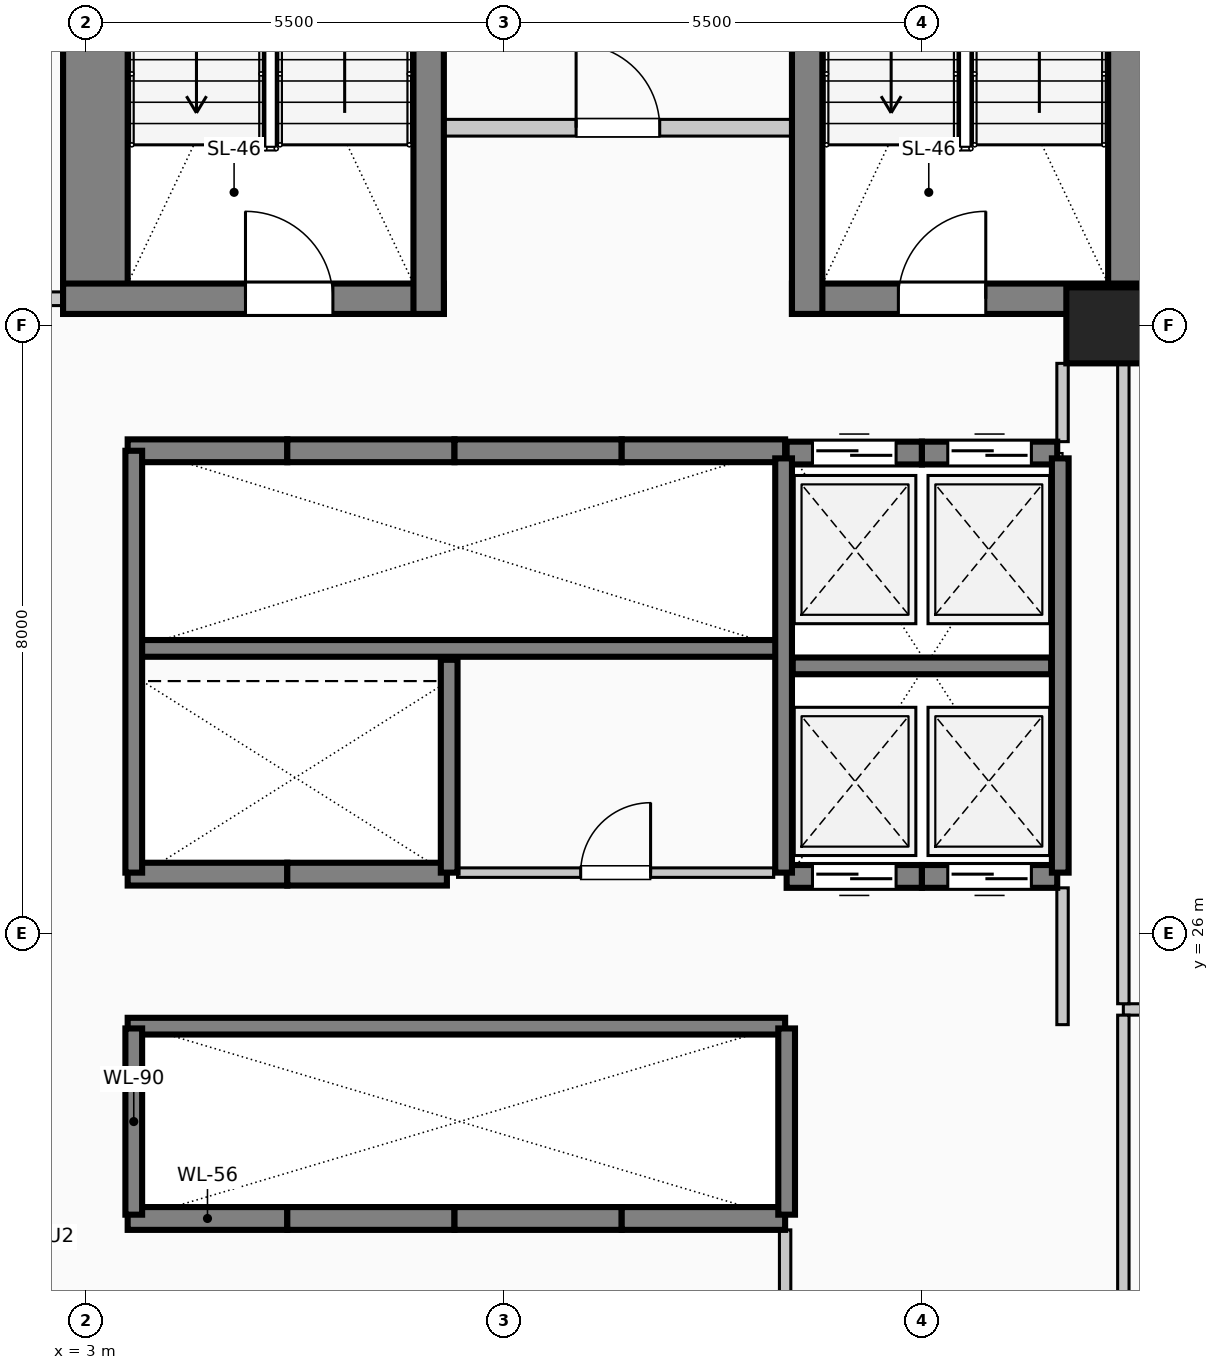
"""IFC4 building model, lengths in metres.
Left out: names, types, materials, properties, quantities, classifications, styles, units other than length and angle.
Written with IfcOpenShell. Run it as: python <this file> out.ifc"""

import sys

from ifc_helpers import new_model, si_unit, direction, frame, frame_2d, origin, origin_2d, place, context, subcontext, project, spatial, rectangle, circle, extrude, element, fill, save


model = new_model("IFC4")
c1 = context("Model", 3, precision=1e-05, world=origin(), true_north=direction((0.0, 1.0)))
c2 = subcontext(c1, "Body", "Model", "MODEL_VIEW")
j1 = project(units=[si_unit("LENGTHUNIT", "METRE"), si_unit("PLANEANGLEUNIT", "RADIAN")], contexts=[c1])
p1 = place(None, origin())
s1 = spatial("IfcSite", under=j1, at=p1, CompositionType="ELEMENT")
p2 = place(p1, origin())
s2 = spatial("IfcBuilding", under=s1, at=p2, CompositionType="ELEMENT")
p3 = place(p2, frame((0.0, 0.0, 92.6)))
s3 = spatial("IfcBuildingStorey", under=s2, at=p3, CompositionType="ELEMENT", Elevation=92.6)
for number, where, z_axis, x_axis in (
    (1, (3.125, 34.15, 0.0), (0.0, 0.0, 1.0), (0.0, 1.0, 0.0)),
    (2, (16.875, 34.15, 0.0), (0.0, 0.0, 1.0), (0.0, 1.0, 0.0)),
):
    element("IfcWall", number, at=place(p3, frame(where, z_axis=z_axis, x_axis=x_axis)), inside=s3, PredefinedType="SHEAR", context=c2, shape_type="SweptSolid", body=[
        extrude(rectangle(XDim=9.13, YDim=0.85, at=frame_2d((4.565, 0.0))), origin(), (0.0, 0.0, 1.0), 4.0),
    ])
p4 = place(p3, frame((2.7, 34.35, 0.0), z_axis=(0.0, 0.0, 1.0), x_axis=(1.0, 0.0, 0.0)))
e3 = element("IfcWall", 3, at=p4, inside=s3, PredefinedType="SHEAR", context=c2, shape_type="SweptSolid", body=[
    extrude(rectangle(XDim=5.01, YDim=0.4, at=frame_2d((2.505, 0.0))), origin(), (0.0, 0.0, 1.0), 4.0),
])
p5 = place(p4, frame((2.4, 0.0, 0.0)))
e4 = element("IfcOpeningElement", 4, at=p5, cuts=e3, PredefinedType="OPENING", context=c2, shape_type="SweptSolid", body=[
    extrude(rectangle(XDim=1.15, YDim=2.2, at=frame_2d((0.575, 1.1))), frame((0.0, 0.21, 0.0), z_axis=(0.0, -1.0, 0.0), x_axis=(1.0, 0.0, 0.0)), (0.0, 0.0, 1.0), 0.42),
])
p6 = place(p3, frame((12.29, 34.35, 0.0), z_axis=(0.0, 0.0, 1.0), x_axis=(1.0, 0.0, 0.0)))
e5 = element("IfcWall", 5, at=p6, inside=s3, PredefinedType="SHEAR", context=c2, shape_type="SweptSolid", body=[
    extrude(rectangle(XDim=5.01, YDim=0.4, at=frame_2d((2.505, 0.0))), origin(), (0.0, 0.0, 1.0), 4.0),
])
p7 = place(p6, frame((1.4, 0.0, 0.0)))
e6 = element("IfcOpeningElement", 6, at=p7, cuts=e5, PredefinedType="OPENING", context=c2, shape_type="SweptSolid", body=[
    extrude(rectangle(XDim=1.15, YDim=2.2, at=frame_2d((0.575, 1.1))), frame((0.0, 0.21, 0.0), z_axis=(0.0, -1.0, 0.0), x_axis=(1.0, 0.0, 0.0)), (0.0, 0.0, 1.0), 0.42),
])
for number, where, z_axis, x_axis in (
    (7, (7.51, 34.15, 0.0), (0.0, 0.0, 1.0), (0.0, 1.0, 0.0)),
    (8, (12.49, 34.15, 0.0), (0.0, 0.0, 1.0), (0.0, 1.0, 0.0)),
):
    element("IfcWall", number, at=place(p3, frame(where, z_axis=z_axis, x_axis=x_axis)), inside=s3, PredefinedType="SHEAR", context=c2, shape_type="SweptSolid", body=[
        extrude(rectangle(XDim=9.13, YDim=0.4, at=frame_2d((4.565, 0.0))), origin(), (0.0, 0.0, 1.0), 4.0),
    ])
p8 = place(p3, frame((16.4, 34.0, 0.0), z_axis=(0.0, 0.0, 1.0), x_axis=(1.0, 0.0, 0.0)))
e9 = element("IfcColumn", 9, at=p8, inside=s3, PredefinedType="COLUMN", context=c2, shape_type="SweptSolid", body=[
    extrude(circle(Radius=0.5, at=origin_2d()), origin(), (0.0, 0.0, 1.0), 4.0),
])
p9 = place(p3, frame((5.65, 22.25, 0.0), z_axis=(0.0, 0.0, 1.0), x_axis=(-1.0, 0.0, 0.0)))
e10 = element("IfcWall", 10, at=p9, inside=s3, PredefinedType="SOLIDWALL", context=c2, shape_type="SweptSolid", body=[
    extrude(rectangle(XDim=2.1, YDim=0.3, at=frame_2d((1.05, 0.0))), origin(), (0.0, 0.0, 1.0), 4.0),
])
p10 = place(p3, frame((7.85, 22.25, 0.0), z_axis=(0.0, 0.0, 1.0), x_axis=(-1.0, 0.0, 0.0)))
e11 = element("IfcWall", 11, at=p10, inside=s3, PredefinedType="SOLIDWALL", context=c2, shape_type="SweptSolid", body=[
    extrude(rectangle(XDim=2.2, YDim=0.3, at=frame_2d((1.1, 0.0))), origin(), (0.0, 0.0, 1.0), 4.0),
])
p11 = place(p3, frame((10.05, 22.25, 0.0), z_axis=(0.0, 0.0, 1.0), x_axis=(-1.0, 0.0, 0.0)))
e12 = element("IfcWall", 12, at=p11, inside=s3, PredefinedType="SOLIDWALL", context=c2, shape_type="SweptSolid", body=[
    extrude(rectangle(XDim=2.2, YDim=0.3, at=frame_2d((1.1, 0.0))), origin(), (0.0, 0.0, 1.0), 4.0),
])
p12 = place(p3, frame((12.2, 22.25, 0.0), z_axis=(0.0, 0.0, 1.0), x_axis=(-1.0, 0.0, 0.0)))
e13 = element("IfcWall", 13, at=p12, inside=s3, PredefinedType="SOLIDWALL", context=c2, shape_type="SweptSolid", body=[
    extrude(rectangle(XDim=2.15, YDim=0.3, at=frame_2d((1.075, 0.0))), origin(), (0.0, 0.0, 1.0), 4.0),
])
p13 = place(p3, frame((14.0, 26.75, 0.0), z_axis=(0.0, 0.0, 1.0), x_axis=(-1.0, 0.0, 0.0)))
e14 = element("IfcWall", 14, at=p13, inside=s3, PredefinedType="SOLIDWALL", context=c2, shape_type="SweptSolid", body=[
    extrude(rectangle(XDim=1.78, YDim=0.3, at=frame_2d((0.89, 0.0))), origin(), (0.0, 0.0, 1.0), 4.0),
])
p14 = place(p13, frame((0.34, 0.0, 0.0)))
e15 = element("IfcOpeningElement", 15, at=p14, cuts=e14, PredefinedType="OPENING", context=c2, shape_type="SweptSolid", body=[
    extrude(rectangle(XDim=1.1, YDim=2.2, at=frame_2d((0.55, 1.1))), frame((0.0, 0.16, 0.0), z_axis=(0.0, -1.0, 0.0), x_axis=(1.0, 0.0, 0.0)), (0.0, 0.0, 1.0), 0.32),
])
p15 = place(p3, frame((15.78, 26.75, 0.0), z_axis=(0.0, 0.0, 1.0), x_axis=(-1.0, 0.0, 0.0)))
e16 = element("IfcWall", 16, at=p15, inside=s3, PredefinedType="SOLIDWALL", context=c2, shape_type="SweptSolid", body=[
    extrude(rectangle(XDim=1.78, YDim=0.3, at=frame_2d((0.89, 0.0))), origin(), (0.0, 0.0, 1.0), 4.0),
])
p16 = place(p15, frame((0.34, 0.0, 0.0)))
e17 = element("IfcOpeningElement", 17, at=p16, cuts=e16, PredefinedType="OPENING", context=c2, shape_type="SweptSolid", body=[
    extrude(rectangle(XDim=1.1, YDim=2.2, at=frame_2d((0.55, 1.1))), frame((0.0, 0.16, 0.0), z_axis=(0.0, -1.0, 0.0), x_axis=(1.0, 0.0, 0.0)), (0.0, 0.0, 1.0), 0.32),
])
p17 = place(p3, frame((12.22, 32.32, 0.0), z_axis=(0.0, 0.0, 1.0), x_axis=(1.0, 0.0, 0.0)))
e18 = element("IfcWall", 18, at=p17, inside=s3, PredefinedType="SOLIDWALL", context=c2, shape_type="SweptSolid", body=[
    extrude(rectangle(XDim=1.78, YDim=0.3, at=frame_2d((0.89, 0.0))), origin(), (0.0, 0.0, 1.0), 4.0),
])
p18 = place(p17, frame((0.34, 0.0, 0.0)))
e19 = element("IfcOpeningElement", 19, at=p18, cuts=e18, PredefinedType="OPENING", context=c2, shape_type="SweptSolid", body=[
    extrude(rectangle(XDim=1.1, YDim=2.2, at=frame_2d((0.55, 1.1))), frame((0.0, 0.16, 0.0), z_axis=(0.0, -1.0, 0.0), x_axis=(1.0, 0.0, 0.0)), (0.0, 0.0, 1.0), 0.32),
])
p19 = place(p3, frame((14.0, 32.32, 0.0), z_axis=(0.0, 0.0, 1.0), x_axis=(1.0, 0.0, 0.0)))
e20 = element("IfcWall", 20, at=p19, inside=s3, PredefinedType="SOLIDWALL", context=c2, shape_type="SweptSolid", body=[
    extrude(rectangle(XDim=1.78, YDim=0.3, at=frame_2d((0.89, 0.0))), origin(), (0.0, 0.0, 1.0), 4.0),
])
p20 = place(p19, frame((0.34, 0.0, 0.0)))
e21 = element("IfcOpeningElement", 21, at=p20, cuts=e20, PredefinedType="OPENING", context=c2, shape_type="SweptSolid", body=[
    extrude(rectangle(XDim=1.1, YDim=2.2, at=frame_2d((0.55, 1.1))), frame((0.0, 0.16, 0.0), z_axis=(0.0, -1.0, 0.0), x_axis=(1.0, 0.0, 0.0)), (0.0, 0.0, 1.0), 0.32),
])
p21 = place(p3, frame((3.55, 32.35, 0.0), z_axis=(0.0, 0.0, 1.0), x_axis=(1.0, 0.0, 0.0)))
e22 = element("IfcWall", 22, at=p21, inside=s3, PredefinedType="SOLIDWALL", context=c2, shape_type="SweptSolid", body=[
    extrude(rectangle(XDim=2.1, YDim=0.3, at=frame_2d((1.05, 0.0))), origin(), (0.0, 0.0, 1.0), 4.0),
])
p22 = place(p3, frame((5.65, 32.35, 0.0), z_axis=(0.0, 0.0, 1.0), x_axis=(1.0, 0.0, 0.0)))
e23 = element("IfcWall", 23, at=p22, inside=s3, PredefinedType="SOLIDWALL", context=c2, shape_type="SweptSolid", body=[
    extrude(rectangle(XDim=2.2, YDim=0.3, at=frame_2d((1.1, 0.0))), origin(), (0.0, 0.0, 1.0), 4.0),
])
p23 = place(p3, frame((7.85, 32.35, 0.0), z_axis=(0.0, 0.0, 1.0), x_axis=(1.0, 0.0, 0.0)))
e24 = element("IfcWall", 24, at=p23, inside=s3, PredefinedType="SOLIDWALL", context=c2, shape_type="SweptSolid", body=[
    extrude(rectangle(XDim=2.2, YDim=0.3, at=frame_2d((1.1, 0.0))), origin(), (0.0, 0.0, 1.0), 4.0),
])
p24 = place(p3, frame((10.05, 32.35, 0.0), z_axis=(0.0, 0.0, 1.0), x_axis=(1.0, 0.0, 0.0)))
e25 = element("IfcWall", 25, at=p24, inside=s3, PredefinedType="SOLIDWALL", context=c2, shape_type="SweptSolid", body=[
    extrude(rectangle(XDim=2.15, YDim=0.3, at=frame_2d((1.075, 0.0))), origin(), (0.0, 0.0, 1.0), 4.0),
])
p25 = place(p3, frame((5.65, 26.78, 0.0), z_axis=(0.0, 0.0, 1.0), x_axis=(-1.0, 0.0, 0.0)))
e26 = element("IfcWall", 26, at=p25, inside=s3, PredefinedType="SOLIDWALL", context=c2, shape_type="SweptSolid", body=[
    extrude(rectangle(XDim=2.1, YDim=0.3, at=frame_2d((1.05, 0.0))), origin(), (0.0, 0.0, 1.0), 4.0),
])
p26 = place(p3, frame((7.75, 26.78, 0.0), z_axis=(0.0, 0.0, 1.0), x_axis=(-1.0, 0.0, 0.0)))
e27 = element("IfcWall", 27, at=p26, inside=s3, PredefinedType="SOLIDWALL", context=c2, shape_type="SweptSolid", body=[
    extrude(rectangle(XDim=2.1, YDim=0.3, at=frame_2d((1.05, 0.0))), origin(), (0.0, 0.0, 1.0), 4.0),
])
p27 = place(p3, frame((3.55, 29.75, 0.0), z_axis=(0.0, 0.0, 1.0), x_axis=(1.0, 0.0, 0.0)))
e28 = element("IfcWall", 28, at=p27, inside=s3, PredefinedType="SOLIDWALL", context=c2, shape_type="SweptSolid", body=[
    extrude(rectangle(XDim=8.65, YDim=0.22, at=frame_2d((4.325, 0.0))), origin(), (0.0, 0.0, 1.0), 4.0),
])
p28 = place(p3, frame((3.63, 26.8, 0.0), z_axis=(0.0, 0.0, 1.0), x_axis=(0.0, 1.0, 0.0)))
e29 = element("IfcWall", 29, at=p28, inside=s3, PredefinedType="SOLIDWALL", context=c2, shape_type="SweptSolid", body=[
    extrude(rectangle(XDim=5.55, YDim=0.22, at=frame_2d((2.775, 0.0))), origin(), (0.0, 0.0, 1.0), 4.0),
])
p29 = place(p3, frame((7.78, 26.8, 0.0), z_axis=(0.0, 0.0, 1.0), x_axis=(0.0, 1.0, 0.0)))
e30 = element("IfcWall", 30, at=p29, inside=s3, PredefinedType="SOLIDWALL", context=c2, shape_type="SweptSolid", body=[
    extrude(rectangle(XDim=2.8, YDim=0.22, at=frame_2d((1.4, 0.0))), origin(), (0.0, 0.0, 1.0), 4.0),
])
for number, where, z_axis, x_axis in (
    (31, (12.18, 26.8, 0.0), (0.0, 0.0, 1.0), (0.0, 1.0, 0.0)),
    (32, (15.82, 26.8, 0.0), (0.0, 0.0, 1.0), (0.0, 1.0, 0.0)),
):
    element("IfcWall", number, at=place(p3, frame(where, z_axis=z_axis, x_axis=x_axis)), inside=s3, PredefinedType="SOLIDWALL", context=c2, shape_type="SweptSolid", body=[
        extrude(rectangle(XDim=5.45, YDim=0.22, at=frame_2d((2.725, 0.0))), origin(), (0.0, 0.0, 1.0), 4.0),
    ])
p30 = place(p3, frame((12.3, 29.52, 0.0), z_axis=(0.0, 0.0, 1.0), x_axis=(1.0, 0.0, 0.0)))
e33 = element("IfcWall", 33, at=p30, inside=s3, PredefinedType="SOLIDWALL", context=c2, shape_type="SweptSolid", body=[
    extrude(rectangle(XDim=3.4, YDim=0.22, at=frame_2d((1.7, 0.0))), origin(), (0.0, 0.0, 1.0), 4.0),
])
p31 = place(p3, frame((3.55, 24.78, 0.0), z_axis=(0.0, 0.0, 1.0), x_axis=(1.0, 0.0, 0.0)))
e34 = element("IfcWall", 34, at=p31, inside=s3, PredefinedType="SOLIDWALL", context=c2, shape_type="SweptSolid", body=[
    extrude(rectangle(XDim=8.65, YDim=0.22, at=frame_2d((4.325, 0.0))), origin(), (0.0, 0.0, 1.0), 4.0),
])
for number, where, z_axis, x_axis in (
    (35, (3.63, 22.3, 0.0), (0.0, 0.0, 1.0), (0.0, 1.0, 0.0)),
    (36, (12.22, 22.3, 0.0), (0.0, 0.0, 1.0), (0.0, 1.0, 0.0)),
):
    element("IfcWall", number, at=place(p3, frame(where, z_axis=z_axis, x_axis=x_axis)), inside=s3, PredefinedType="SOLIDWALL", context=c2, shape_type="SweptSolid", body=[
        extrude(rectangle(XDim=2.45, YDim=0.22, at=frame_2d((1.225, 0.0))), origin(), (0.0, 0.0, 1.0), 4.0),
    ])
p32 = place(p3, frame((7.51, 36.6, 0.0), z_axis=(0.0, 0.0, 1.0), x_axis=(1.0, 0.0, 0.0)))
e37 = element("IfcWall", 37, at=p32, inside=s3, PredefinedType="PARTITIONING", context=c2, shape_type="SweptSolid", body=[
    extrude(rectangle(XDim=4.98, YDim=0.22, at=frame_2d((2.49, 0.0))), origin(), (0.0, 0.0, 1.0), 3.725),
])
p33 = place(p32, frame((1.94, 0.0, 0.0)))
e38 = element("IfcOpeningElement", 38, at=p33, cuts=e37, PredefinedType="OPENING", context=c2, shape_type="SweptSolid", body=[
    extrude(rectangle(XDim=1.1, YDim=2.2, at=frame_2d((0.55, 1.1))), frame((0.0, 0.12, 0.0), z_axis=(0.0, -1.0, 0.0), x_axis=(1.0, 0.0, 0.0)), (0.0, 0.0, 1.0), 0.24),
])
p34 = place(p3, frame((16.65, 25.0, 0.0), z_axis=(0.0, 0.0, 1.0), x_axis=(1.0, 0.0, 0.0)))
e39 = element("IfcWall", 39, at=p34, inside=s3, PredefinedType="PARTITIONING", context=c2, shape_type="SweptSolid", body=[
    extrude(rectangle(XDim=13.95, YDim=0.15, at=frame_2d((6.975, 0.0))), origin(), (0.0, 0.0, 1.0), 3.725),
])
p35 = place(p3, frame((7.89, 26.8, 0.0), z_axis=(0.0, 0.0, 1.0), x_axis=(1.0, 0.0, 0.0)))
e40 = element("IfcWall", 40, at=p35, inside=s3, PredefinedType="PARTITIONING", context=c2, shape_type="SweptSolid", body=[
    extrude(rectangle(XDim=4.16, YDim=0.125, at=frame_2d((2.08, 0.0))), origin(), (0.0, 0.0, 1.0), 3.725),
])
p36 = place(p35, frame((1.62, 0.0, 0.0)))
e41 = element("IfcOpeningElement", 41, at=p36, cuts=e40, PredefinedType="OPENING", context=c2, shape_type="SweptSolid", body=[
    extrude(rectangle(XDim=0.92, YDim=2.1, at=frame_2d((0.46, 1.05))), frame((0.0, 0.073, 0.0), z_axis=(0.0, -1.0, 0.0), x_axis=(1.0, 0.0, 0.0)), (0.0, 0.0, 1.0), 0.145),
])
p37 = place(p3, frame((1.175, 34.35, 0.0), z_axis=(0.0, 0.0, 1.0), x_axis=(1.0, 0.0, 0.0)))
e42 = element("IfcWall", 42, at=p37, inside=s3, PredefinedType="PARTITIONING", context=c2, shape_type="SweptSolid", body=[
    extrude(rectangle(XDim=1.525, YDim=0.18, at=frame_2d((0.762, 0.0))), origin(), (0.0, 0.0, 1.0), 3.725),
])
p38 = place(p3, frame((12.2, 20.275, 0.0), z_axis=(0.0, 0.0, 1.0), x_axis=(0.0, 1.0, 0.0)))
e43 = element("IfcWall", 43, at=p38, inside=s3, PredefinedType="PARTITIONING", context=c2, shape_type="SweptSolid", body=[
    extrude(rectangle(XDim=1.825, YDim=0.15, at=frame_2d((0.913, 0.0))), origin(), (0.0, 0.0, 1.0), 3.725),
])
p39 = place(p3, frame((15.85, 24.8, 0.0), z_axis=(0.0, 0.0, 1.0), x_axis=(0.0, 1.0, 0.0)))
e44 = element("IfcWall", 44, at=p39, inside=s3, PredefinedType="PARTITIONING", context=c2, shape_type="SweptSolid", body=[
    extrude(rectangle(XDim=1.8, YDim=0.15, at=frame_2d((0.9, 0.0))), origin(), (0.0, 0.0, 1.0), 3.725),
])
p40 = place(p3, frame((15.85, 32.47, 0.0), z_axis=(0.0, 0.0, 1.0), x_axis=(0.0, 1.0, 0.0)))
e45 = element("IfcWall", 45, at=p40, inside=s3, PredefinedType="PARTITIONING", context=c2, shape_type="SweptSolid", body=[
    extrude(rectangle(XDim=1.03, YDim=0.15, at=frame_2d((0.515, 0.0))), origin(), (0.0, 0.0, 1.0), 3.725),
])
p41 = place(p3, frame((16.65, 18.5, 0.0), z_axis=(0.0, 0.0, 1.0), x_axis=(0.0, 1.0, 0.0)))
e46 = element("IfcWall", 46, at=p41, inside=s3, PredefinedType="PARTITIONING", context=c2, shape_type="SweptSolid", body=[
    extrude(rectangle(XDim=6.425, YDim=0.15, at=frame_2d((3.212, 0.0))), origin(), (0.0, 0.0, 1.0), 3.07),
])
p42 = place(p3, frame((16.65, 25.075, 0.0), z_axis=(0.0, 0.0, 1.0), x_axis=(0.0, 1.0, 0.0)))
e47 = element("IfcWall", 47, at=p42, inside=s3, PredefinedType="PARTITIONING", context=c2, shape_type="SweptSolid", body=[
    extrude(rectangle(XDim=8.425, YDim=0.15, at=frame_2d((4.212, 0.0))), origin(), (0.0, 0.0, 1.0), 3.07),
])
p43 = place(p14, origin())
e48 = element("IfcDoor", 48, at=p43, inside=s3, OperationType="SLIDING_TO_LEFT", PredefinedType="DOOR", context=c2, shape_type="SweptSolid", body=[
    extrude(rectangle(XDim=1.1, YDim=2.2, at=frame_2d((0.55, 1.1))), frame((0.0, 0.025, 0.0), z_axis=(0.0, -1.0, 0.0), x_axis=(1.0, 0.0, 0.0)), (0.0, 0.0, 1.0), 0.05),
])
fill(e15, e48)
p44 = place(p16, origin())
e49 = element("IfcDoor", 49, at=p44, inside=s3, OperationType="SLIDING_TO_RIGHT", PredefinedType="DOOR", context=c2, shape_type="SweptSolid", body=[
    extrude(rectangle(XDim=1.1, YDim=2.2, at=frame_2d((0.55, 1.1))), frame((0.0, 0.025, 0.0), z_axis=(0.0, -1.0, 0.0), x_axis=(1.0, 0.0, 0.0)), (0.0, 0.0, 1.0), 0.05),
])
fill(e17, e49)
p45 = place(p18, origin())
e50 = element("IfcDoor", 50, at=p45, inside=s3, OperationType="SLIDING_TO_LEFT", PredefinedType="DOOR", context=c2, shape_type="SweptSolid", body=[
    extrude(rectangle(XDim=1.1, YDim=2.2, at=frame_2d((0.55, 1.1))), frame((0.0, 0.025, 0.0), z_axis=(0.0, -1.0, 0.0), x_axis=(1.0, 0.0, 0.0)), (0.0, 0.0, 1.0), 0.05),
])
fill(e19, e50)
p46 = place(p20, origin())
e51 = element("IfcDoor", 51, at=p46, inside=s3, OperationType="SLIDING_TO_RIGHT", PredefinedType="DOOR", context=c2, shape_type="SweptSolid", body=[
    extrude(rectangle(XDim=1.1, YDim=2.2, at=frame_2d((0.55, 1.1))), frame((0.0, 0.025, 0.0), z_axis=(0.0, -1.0, 0.0), x_axis=(1.0, 0.0, 0.0)), (0.0, 0.0, 1.0), 0.05),
])
fill(e21, e51)
p47 = place(p5, origin())
e52 = element("IfcDoor", 52, at=p47, inside=s3, OperationType="SINGLE_SWING_LEFT", PredefinedType="DOOR", context=c2, shape_type="SweptSolid", body=[
    extrude(rectangle(XDim=1.15, YDim=2.2, at=frame_2d((0.575, 1.1))), frame((0.0, 0.025, 0.0), z_axis=(0.0, -1.0, 0.0), x_axis=(1.0, 0.0, 0.0)), (0.0, 0.0, 1.0), 0.05),
])
fill(e4, e52)
p48 = place(p7, origin())
e53 = element("IfcDoor", 53, at=p48, inside=s3, OperationType="SINGLE_SWING_RIGHT", PredefinedType="DOOR", context=c2, shape_type="SweptSolid", body=[
    extrude(rectangle(XDim=1.15, YDim=2.2, at=frame_2d((0.575, 1.1))), frame((0.0, 0.025, 0.0), z_axis=(0.0, -1.0, 0.0), x_axis=(1.0, 0.0, 0.0)), (0.0, 0.0, 1.0), 0.05),
])
fill(e6, e53)
p49 = place(p33, origin())
e54 = element("IfcDoor", 54, at=p49, inside=s3, OperationType="SINGLE_SWING_LEFT", PredefinedType="DOOR", context=c2, shape_type="SweptSolid", body=[
    extrude(rectangle(XDim=1.1, YDim=2.2, at=frame_2d((0.55, 1.1))), frame((0.0, 0.025, 0.0), z_axis=(0.0, -1.0, 0.0), x_axis=(1.0, 0.0, 0.0)), (0.0, 0.0, 1.0), 0.05),
])
fill(e38, e54)
p50 = place(p36, origin())
e55 = element("IfcDoor", 55, at=p50, inside=s3, OperationType="SINGLE_SWING_RIGHT", PredefinedType="DOOR", context=c2, shape_type="SweptSolid", body=[
    extrude(rectangle(XDim=0.92, YDim=2.1, at=frame_2d((0.46, 1.05))), frame((0.0, 0.025, 0.0), z_axis=(0.0, -1.0, 0.0), x_axis=(1.0, 0.0, 0.0)), (0.0, 0.0, 1.0), 0.05),
])
fill(e41, e55)
save(model, sys.argv[1])
